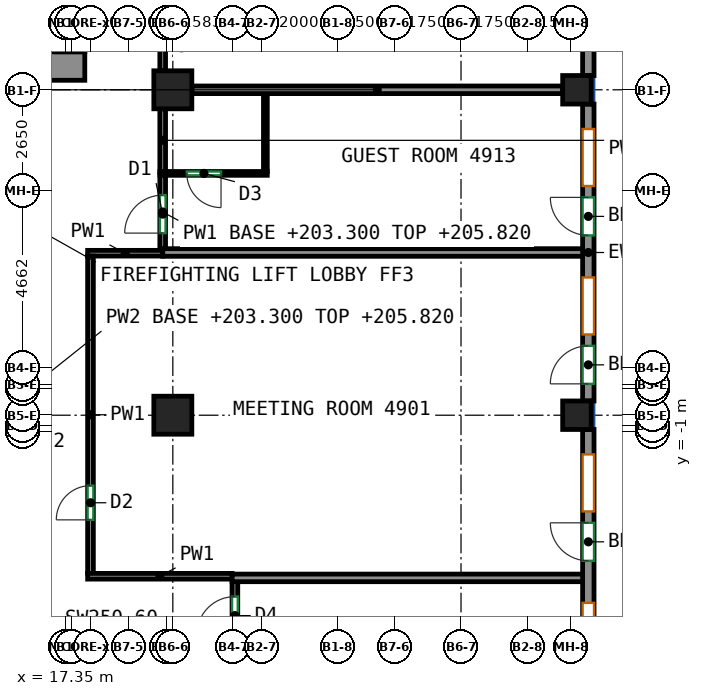
"""IFC4 building model, lengths in metres.
Left out: names, types, materials, properties, quantities, classifications, styles, units other than length and angle.
Written with IfcOpenShell. Run it as: python <this file> out.ifc"""

import sys

from ifc_helpers import new_model, si_unit, direction, frame, frame_2d, origin, origin_2d, place, context, subcontext, project, spatial, rectangle, extrude, source, transform, mapped, element, fill, save


model = new_model("IFC4")
c1 = context("Model", 3, precision=1e-05, world=origin(), true_north=direction((0.0, 1.0)))
c2 = subcontext(c1, "Body", "Model", "MODEL_VIEW")
j1 = project(units=[si_unit("LENGTHUNIT", "METRE"), si_unit("PLANEANGLEUNIT", "RADIAN")], contexts=[c1])
p1 = place(None, origin())
s1 = spatial("IfcSite", under=j1, at=p1, CompositionType="ELEMENT")
p2 = place(p1, origin())
s2 = spatial("IfcBuilding", under=s1, at=p2, CompositionType="ELEMENT")
p3 = place(p2, frame((0.0, 0.0, 203.3)))
s3 = spatial("IfcBuildingStorey", under=s2, at=p3, CompositionType="ELEMENT", Elevation=203.3)
m1 = source(origin(), c2, "Body", "SweptSolid", [
    extrude(rectangle(XDim=1.0, YDim=1.0, at=origin_2d()), origin(), (0.0, 0.0, 1.0), 3.12),
])
for number, where, z_axis, x_axis in (
    (1, (20.167, -0.562, 0.0), (0.0, 0.0, 1.0), (1.0, 0.0, 0.0)),
    (2, (20.167, 8.0, 0.0), (0.0, 0.0, 1.0), (1.0, 0.0, 0.0)),
):
    element("IfcColumn", number, at=place(p3, frame(where, z_axis=z_axis, x_axis=x_axis)), inside=s3, PredefinedType="COLUMN", context=c2, shape_type="MappedRepresentation", body=[
        mapped(m1, transform((0.0, 0.0, 0.0))),
    ])
m2 = source(origin(), c2, "Body", "SweptSolid", [
    extrude(rectangle(XDim=0.75, YDim=0.75, at=origin_2d()), origin(), (0.0, 0.0, 1.0), 3.12),
])
for number, where, z_axis, x_axis in (
    (3, (30.8, -0.562, 0.0), (0.0, 0.0, 1.0), (1.0, 0.0, 0.0)),
    (4, (30.8, 8.0, 0.0), (0.0, 0.0, 1.0), (1.0, 0.0, 0.0)),
):
    element("IfcColumn", number, at=place(p3, frame(where, z_axis=z_axis, x_axis=x_axis)), inside=s3, PredefinedType="COLUMN", context=c2, shape_type="MappedRepresentation", body=[
        mapped(m2, transform((0.0, 0.0, 0.0))),
    ])
m3 = source(origin(), c2, "Body", "SweptSolid", [
    extrude(rectangle(XDim=5.38, YDim=0.75, at=frame_2d((2.69, 0.0))), origin(), (0.0, 0.0, 1.0), 3.12),
])
p4 = place(p3, frame((12.47, 8.625, 0.0), z_axis=(0.0, 0.0, 1.0), x_axis=(1.0, 0.0, 0.0)))
e5 = element("IfcWall", 5, at=p4, inside=s3, PredefinedType="SHEAR", context=c2, shape_type="MappedRepresentation", body=[
    mapped(m3, transform((0.0, 0.0, 0.0))),
])
p5 = place(p4, frame((2.18, 0.0, 0.0)))
e6 = element("IfcOpeningElement", 6, at=p5, cuts=e5, PredefinedType="OPENING", context=c2, shape_type="SweptSolid", body=[
    extrude(rectangle(XDim=1.2, YDim=2.1, at=frame_2d((0.6, 1.05))), frame((0.0, 0.385, 0.0), z_axis=(0.0, -1.0, 0.0), x_axis=(1.0, 0.0, 0.0)), (0.0, 0.0, 1.0), 0.77),
])
m4 = source(origin(), c2, "Body", "SweptSolid", [
    extrude(rectangle(XDim=7.812, YDim=0.3, at=frame_2d((3.906, 0.0))), origin(), (0.0, 0.0, 1.0), 3.12),
])
p6 = place(p3, frame((31.1, -8.75, 0.0), z_axis=(0.0, 0.0, 1.0), x_axis=(0.0, 1.0, 0.0)))
e7 = element("IfcWall", 7, at=p6, inside=s3, PredefinedType="SOLIDWALL", context=c2, shape_type="MappedRepresentation", body=[
    mapped(m4, transform((0.0, 0.0, 0.0))),
])
p7 = place(p6, frame((1.75, 0.0, 0.85)))
e8 = element("IfcOpeningElement", 8, at=p7, cuts=e7, PredefinedType="OPENING", context=c2, shape_type="SweptSolid", body=[
    extrude(rectangle(XDim=1.5, YDim=1.95, at=frame_2d((0.75, 0.975))), frame((0.0, 0.16, 0.0), z_axis=(0.0, -1.0, 0.0), x_axis=(1.0, 0.0, 0.0)), (0.0, 0.0, 1.0), 0.32),
])
p8 = place(p6, frame((5.656, 0.0, 0.85)))
e9 = element("IfcOpeningElement", 9, at=p8, cuts=e7, PredefinedType="OPENING", context=c2, shape_type="SweptSolid", body=[
    extrude(rectangle(XDim=1.5, YDim=1.95, at=frame_2d((0.75, 0.975))), frame((0.0, 0.16, 0.0), z_axis=(0.0, -1.0, 0.0), x_axis=(1.0, 0.0, 0.0)), (0.0, 0.0, 1.0), 0.32),
])
p9 = place(p6, frame((4.356, 0.0, 0.0)))
e10 = element("IfcOpeningElement", 10, at=p9, cuts=e7, PredefinedType="OPENING", context=c2, shape_type="SweptSolid", body=[
    extrude(rectangle(XDim=1.0, YDim=2.1, at=frame_2d((0.5, 1.05))), frame((0.0, 0.16, 0.0), z_axis=(0.0, -1.0, 0.0), x_axis=(1.0, 0.0, 0.0)), (0.0, 0.0, 1.0), 0.32),
])
p10 = place(p3, frame((31.1, -0.188, 0.0), z_axis=(0.0, 0.0, 1.0), x_axis=(0.0, 1.0, 0.0)))
e11 = element("IfcWall", 11, at=p10, inside=s3, PredefinedType="SOLIDWALL", context=c2, shape_type="MappedRepresentation", body=[
    mapped(m4, transform((0.0, 0.0, 0.0))),
])
p11 = place(p10, frame((1.75, 0.0, 0.85)))
e12 = element("IfcOpeningElement", 12, at=p11, cuts=e11, PredefinedType="OPENING", context=c2, shape_type="SweptSolid", body=[
    extrude(rectangle(XDim=1.5, YDim=1.95, at=frame_2d((0.75, 0.975))), frame((0.0, 0.16, 0.0), z_axis=(0.0, -1.0, 0.0), x_axis=(1.0, 0.0, 0.0)), (0.0, 0.0, 1.0), 0.32),
])
p12 = place(p10, frame((0.45, 0.0, 0.0)))
e13 = element("IfcOpeningElement", 13, at=p12, cuts=e11, PredefinedType="OPENING", context=c2, shape_type="SweptSolid", body=[
    extrude(rectangle(XDim=1.0, YDim=2.1, at=frame_2d((0.5, 1.05))), frame((0.0, 0.16, 0.0), z_axis=(0.0, -1.0, 0.0), x_axis=(1.0, 0.0, 0.0)), (0.0, 0.0, 1.0), 0.32),
])
p13 = place(p10, frame((5.656, 0.0, 0.85)))
e14 = element("IfcOpeningElement", 14, at=p13, cuts=e11, PredefinedType="OPENING", context=c2, shape_type="SweptSolid", body=[
    extrude(rectangle(XDim=1.5, YDim=1.95, at=frame_2d((0.75, 0.975))), frame((0.0, 0.16, 0.0), z_axis=(0.0, -1.0, 0.0), x_axis=(1.0, 0.0, 0.0)), (0.0, 0.0, 1.0), 0.32),
])
p14 = place(p10, frame((4.356, 0.0, 0.0)))
e15 = element("IfcOpeningElement", 15, at=p14, cuts=e11, PredefinedType="OPENING", context=c2, shape_type="SweptSolid", body=[
    extrude(rectangle(XDim=1.0, YDim=2.1, at=frame_2d((0.5, 1.05))), frame((0.0, 0.16, 0.0), z_axis=(0.0, -1.0, 0.0), x_axis=(1.0, 0.0, 0.0)), (0.0, 0.0, 1.0), 0.32),
])
m5 = source(origin(), c2, "Body", "SweptSolid", [
    extrude(rectangle(XDim=14.0, YDim=0.3, at=frame_2d((7.0, 0.0))), origin(), (0.0, 0.0, 1.0), 3.12),
])
p15 = place(p3, frame((31.1, 8.375, 0.0), z_axis=(0.0, 0.0, 1.0), x_axis=(0.0, 1.0, 0.0)))
e16 = element("IfcWall", 16, at=p15, inside=s3, PredefinedType="SOLIDWALL", context=c2, shape_type="MappedRepresentation", body=[
    mapped(m5, transform((0.0, 0.0, 0.0))),
])
p16 = place(p15, frame((1.75, 0.0, 0.85)))
e17 = element("IfcOpeningElement", 17, at=p16, cuts=e16, PredefinedType="OPENING", context=c2, shape_type="SweptSolid", body=[
    extrude(rectangle(XDim=1.5, YDim=1.95, at=frame_2d((0.75, 0.975))), frame((0.0, 0.16, 0.0), z_axis=(0.0, -1.0, 0.0), x_axis=(1.0, 0.0, 0.0)), (0.0, 0.0, 1.0), 0.32),
])
p17 = place(p15, frame((5.25, 0.0, 0.85)))
e18 = element("IfcOpeningElement", 18, at=p17, cuts=e16, PredefinedType="OPENING", context=c2, shape_type="SweptSolid", body=[
    extrude(rectangle(XDim=1.5, YDim=1.95, at=frame_2d((0.75, 0.975))), frame((0.0, 0.16, 0.0), z_axis=(0.0, -1.0, 0.0), x_axis=(1.0, 0.0, 0.0)), (0.0, 0.0, 1.0), 0.32),
])
p18 = place(p15, frame((8.75, 0.0, 0.85)))
e19 = element("IfcOpeningElement", 19, at=p18, cuts=e16, PredefinedType="OPENING", context=c2, shape_type="SweptSolid", body=[
    extrude(rectangle(XDim=1.5, YDim=1.95, at=frame_2d((0.75, 0.975))), frame((0.0, 0.16, 0.0), z_axis=(0.0, -1.0, 0.0), x_axis=(1.0, 0.0, 0.0)), (0.0, 0.0, 1.0), 0.32),
])
p19 = place(p15, frame((12.25, 0.0, 0.85)))
e20 = element("IfcOpeningElement", 20, at=p19, cuts=e16, PredefinedType="OPENING", context=c2, shape_type="SweptSolid", body=[
    extrude(rectangle(XDim=1.5, YDim=1.95, at=frame_2d((0.75, 0.975))), frame((0.0, 0.16, 0.0), z_axis=(0.0, -1.0, 0.0), x_axis=(1.0, 0.0, 0.0)), (0.0, 0.0, 1.0), 0.32),
])
p20 = place(p3, frame((19.9, 3.809, 0.0), z_axis=(0.0, 0.0, 1.0), x_axis=(0.0, 1.0, 0.0)))
e21 = element("IfcWall", 21, at=p20, inside=s3, PredefinedType="PARTITIONING", context=c2, shape_type="SweptSolid", body=[
    extrude(rectangle(XDim=1.951, YDim=0.15, at=frame_2d((0.976, 0.0))), origin(), (0.0, 0.0, 1.0), 2.52),
])
p21 = place(p20, frame((0.42, 0.0, 0.0)))
e22 = element("IfcOpeningElement", 22, at=p21, cuts=e21, PredefinedType="OPENING", context=c2, shape_type="SweptSolid", body=[
    extrude(rectangle(XDim=1.0, YDim=2.1, at=frame_2d((0.5, 1.05))), frame((0.0, 0.085, 0.0), z_axis=(0.0, -1.0, 0.0), x_axis=(1.0, 0.0, 0.0)), (0.0, 0.0, 1.0), 0.17),
])
p22 = place(p3, frame((19.9, 5.84, 0.0), z_axis=(0.0, 0.0, 1.0), x_axis=(0.0, 1.0, 0.0)))
e23 = element("IfcWall", 23, at=p22, inside=s3, PredefinedType="PARTITIONING", context=c2, shape_type="SweptSolid", body=[
    extrude(rectangle(XDim=1.66, YDim=0.15, at=frame_2d((0.83, 0.0))), origin(), (0.0, 0.0, 1.0), 2.52),
])
p23 = place(p3, frame((19.9, 8.5, 0.0), z_axis=(0.0, 0.0, 1.0), x_axis=(0.0, 1.0, 0.0)))
e24 = element("IfcWall", 24, at=p23, inside=s3, PredefinedType="PARTITIONING", context=c2, shape_type="SweptSolid", body=[
    extrude(rectangle(XDim=1.25, YDim=0.15, at=frame_2d((0.625, 0.0))), origin(), (0.0, 0.0, 1.0), 3.12),
])
p24 = place(p3, frame((17.925, 3.7, 0.0), z_axis=(0.0, 0.0, 1.0), x_axis=(1.0, 0.0, 0.0)))
e25 = element("IfcWall", 25, at=p24, inside=s3, PredefinedType="PARTITIONING", context=c2, shape_type="SweptSolid", body=[
    extrude(rectangle(XDim=1.975, YDim=0.15, at=frame_2d((0.987, 0.0))), origin(), (0.0, 0.0, 1.0), 3.12),
])
p25 = place(p3, frame((18.0, -4.725, 0.0), z_axis=(0.0, 0.0, 1.0), x_axis=(0.0, 1.0, 0.0)))
e26 = element("IfcWall", 26, at=p25, inside=s3, PredefinedType="PARTITIONING", context=c2, shape_type="SweptSolid", body=[
    extrude(rectangle(XDim=8.35, YDim=0.15, at=frame_2d((4.175, 0.0))), origin(), (0.0, 0.0, 1.0), 3.12),
])
p26 = place(p25, frame((1.409, 0.0, 0.0)))
e27 = element("IfcOpeningElement", 27, at=p26, cuts=e26, PredefinedType="OPENING", context=c2, shape_type="SweptSolid", body=[
    extrude(rectangle(XDim=0.9, YDim=2.1, at=frame_2d((0.45, 1.05))), frame((0.0, 0.085, 0.0), z_axis=(0.0, -1.0, 0.0), x_axis=(1.0, 0.0, 0.0)), (0.0, 0.0, 1.0), 0.17),
])
p27 = place(p3, frame((17.925, -4.8, 0.0), z_axis=(0.0, 0.0, 1.0), x_axis=(1.0, 0.0, 0.0)))
e28 = element("IfcWall", 28, at=p27, inside=s3, PredefinedType="PARTITIONING", context=c2, shape_type="SweptSolid", body=[
    extrude(rectangle(XDim=3.802, YDim=0.15, at=frame_2d((1.901, 0.0))), origin(), (0.0, 0.0, 1.0), 3.12),
])
p28 = place(p3, frame((21.8, -7.75, 0.0), z_axis=(0.0, 0.0, 1.0), x_axis=(0.0, 1.0, 0.0)))
e29 = element("IfcWall", 29, at=p28, inside=s3, PredefinedType="PARTITIONING", context=c2, shape_type="SweptSolid", body=[
    extrude(rectangle(XDim=2.817, YDim=0.15, at=frame_2d((1.408, 0.0))), origin(), (0.0, 0.0, 1.0), 3.12),
])
p29 = place(p28, frame((1.415, 0.0, 0.0)))
e30 = element("IfcOpeningElement", 30, at=p29, cuts=e29, PredefinedType="OPENING", context=c2, shape_type="SweptSolid", body=[
    extrude(rectangle(XDim=1.0, YDim=2.1, at=frame_2d((0.5, 1.05))), frame((0.0, 0.085, 0.0), z_axis=(0.0, -1.0, 0.0), x_axis=(1.0, 0.0, 0.0)), (0.0, 0.0, 1.0), 0.17),
])
p30 = place(p3, frame((22.652, 5.8, 0.0), z_axis=(0.0, 0.0, 1.0), x_axis=(-1.0, 0.0, 0.0)))
e31 = element("IfcWall", 31, at=p30, inside=s3, PredefinedType="PARTITIONING", context=c2, shape_type="SweptSolid", body=[
    extrude(rectangle(XDim=2.825, YDim=0.1, at=frame_2d((1.413, 0.0))), origin(), (0.0, 0.0, 1.0), 3.12),
])
p31 = place(p30, frame((1.217, 0.0, 0.0)))
e32 = element("IfcOpeningElement", 32, at=p31, cuts=e31, PredefinedType="OPENING", context=c2, shape_type="SweptSolid", body=[
    extrude(rectangle(XDim=0.9, YDim=2.1, at=frame_2d((0.45, 1.05))), frame((0.0, 0.06, 0.0), z_axis=(0.0, -1.0, 0.0), x_axis=(1.0, 0.0, 0.0)), (0.0, 0.0, 1.0), 0.12),
])
p32 = place(p3, frame((22.602, 5.85, 0.0), z_axis=(0.0, 0.0, 1.0), x_axis=(0.0, 1.0, 0.0)))
e33 = element("IfcWall", 33, at=p32, inside=s3, PredefinedType="PARTITIONING", context=c2, shape_type="SweptSolid", body=[
    extrude(rectangle(XDim=2.05, YDim=0.1, at=frame_2d((1.025, 0.0))), origin(), (0.0, 0.0, 1.0), 3.12),
])
p33 = place(p3, frame((19.902, 3.719, 0.0), z_axis=(0.0, 0.0, 1.0), x_axis=(1.0, 0.0, 0.0)))
e34 = element("IfcWall", 34, at=p33, inside=s3, PredefinedType="PARTITIONING", context=c2, shape_type="SweptSolid", body=[
    extrude(rectangle(XDim=11.098, YDim=0.2, at=frame_2d((5.549, 0.0))), origin(), (0.0, 0.0, 1.0), 3.12),
])
p34 = place(p3, frame((20.667, 8.0, 0.0), z_axis=(0.0, 0.0, 1.0), x_axis=(1.0, 0.0, 0.0)))
e35 = element("IfcWall", 35, at=p34, inside=s3, PredefinedType="PARTITIONING", context=c2, shape_type="SweptSolid", body=[
    extrude(rectangle(XDim=9.758, YDim=0.2, at=frame_2d((4.879, 0.0))), origin(), (0.0, 0.0, 1.0), 2.52),
])
p35 = place(p3, frame((21.727, -4.843, 0.0), z_axis=(0.0, 0.0, 1.0), x_axis=(1.0, 0.0, 0.0)))
e36 = element("IfcWall", 36, at=p35, inside=s3, PredefinedType="PARTITIONING", context=c2, shape_type="SweptSolid", body=[
    extrude(rectangle(XDim=9.273, YDim=0.2, at=frame_2d((4.636, 0.0))), origin(), (0.0, 0.0, 1.0), 3.12),
])
p36 = place(p7, origin())
e37 = element("IfcWindow", 37, at=p36, inside=s3, PartitioningType="SINGLE_PANEL", PredefinedType="WINDOW", context=c2, shape_type="SweptSolid", body=[
    extrude(rectangle(XDim=1.5, YDim=1.95, at=frame_2d((0.75, 0.975))), frame((0.0, 0.03, 0.0), z_axis=(0.0, -1.0, 0.0), x_axis=(1.0, 0.0, 0.0)), (0.0, 0.0, 1.0), 0.06),
])
fill(e8, e37)
p37 = place(p8, origin())
e38 = element("IfcWindow", 38, at=p37, inside=s3, PartitioningType="SINGLE_PANEL", PredefinedType="WINDOW", context=c2, shape_type="SweptSolid", body=[
    extrude(rectangle(XDim=1.5, YDim=1.95, at=frame_2d((0.75, 0.975))), frame((0.0, 0.03, 0.0), z_axis=(0.0, -1.0, 0.0), x_axis=(1.0, 0.0, 0.0)), (0.0, 0.0, 1.0), 0.06),
])
fill(e9, e38)
p38 = place(p9, origin())
e39 = element("IfcDoor", 39, at=p38, inside=s3, OperationType="SINGLE_SWING_RIGHT", PredefinedType="DOOR", context=c2, shape_type="SweptSolid", body=[
    extrude(rectangle(XDim=1.0, YDim=2.1, at=frame_2d((0.5, 1.05))), frame((0.0, 0.025, 0.0), z_axis=(0.0, -1.0, 0.0), x_axis=(1.0, 0.0, 0.0)), (0.0, 0.0, 1.0), 0.05),
])
fill(e10, e39)
p39 = place(p11, origin())
e40 = element("IfcWindow", 40, at=p39, inside=s3, PartitioningType="SINGLE_PANEL", PredefinedType="WINDOW", context=c2, shape_type="SweptSolid", body=[
    extrude(rectangle(XDim=1.5, YDim=1.95, at=frame_2d((0.75, 0.975))), frame((0.0, 0.03, 0.0), z_axis=(0.0, -1.0, 0.0), x_axis=(1.0, 0.0, 0.0)), (0.0, 0.0, 1.0), 0.06),
])
fill(e12, e40)
p40 = place(p12, origin())
e41 = element("IfcDoor", 41, at=p40, inside=s3, OperationType="SINGLE_SWING_LEFT", PredefinedType="DOOR", context=c2, shape_type="SweptSolid", body=[
    extrude(rectangle(XDim=1.0, YDim=2.1, at=frame_2d((0.5, 1.05))), frame((0.0, 0.025, 0.0), z_axis=(0.0, -1.0, 0.0), x_axis=(1.0, 0.0, 0.0)), (0.0, 0.0, 1.0), 0.05),
])
fill(e13, e41)
p41 = place(p13, origin())
e42 = element("IfcWindow", 42, at=p41, inside=s3, PartitioningType="SINGLE_PANEL", PredefinedType="WINDOW", context=c2, shape_type="SweptSolid", body=[
    extrude(rectangle(XDim=1.5, YDim=1.95, at=frame_2d((0.75, 0.975))), frame((0.0, 0.03, 0.0), z_axis=(0.0, -1.0, 0.0), x_axis=(1.0, 0.0, 0.0)), (0.0, 0.0, 1.0), 0.06),
])
fill(e14, e42)
p42 = place(p14, origin())
e43 = element("IfcDoor", 43, at=p42, inside=s3, OperationType="SINGLE_SWING_RIGHT", PredefinedType="DOOR", context=c2, shape_type="SweptSolid", body=[
    extrude(rectangle(XDim=1.0, YDim=2.1, at=frame_2d((0.5, 1.05))), frame((0.0, 0.025, 0.0), z_axis=(0.0, -1.0, 0.0), x_axis=(1.0, 0.0, 0.0)), (0.0, 0.0, 1.0), 0.05),
])
fill(e15, e43)
p43 = place(p29, origin())
e44 = element("IfcDoor", 44, at=p43, inside=s3, OperationType="SINGLE_SWING_LEFT", PredefinedType="DOOR", context=c2, shape_type="SweptSolid", body=[
    extrude(rectangle(XDim=1.0, YDim=2.1, at=frame_2d((0.5, 1.05))), frame((0.0, 0.025, 0.0), z_axis=(0.0, -1.0, 0.0), x_axis=(1.0, 0.0, 0.0)), (0.0, 0.0, 1.0), 0.05),
])
fill(e30, e44)
p44 = place(p26, origin())
e45 = element("IfcDoor", 45, at=p44, inside=s3, OperationType="SINGLE_SWING_LEFT", PredefinedType="DOOR", context=c2, shape_type="SweptSolid", body=[
    extrude(rectangle(XDim=0.9, YDim=2.1, at=frame_2d((0.45, 1.05))), frame((0.0, 0.025, 0.0), z_axis=(0.0, -1.0, 0.0), x_axis=(1.0, 0.0, 0.0)), (0.0, 0.0, 1.0), 0.05),
])
fill(e27, e45)
p45 = place(p21, origin())
e46 = element("IfcDoor", 46, at=p45, inside=s3, OperationType="SINGLE_SWING_LEFT", PredefinedType="DOOR", context=c2, shape_type="SweptSolid", body=[
    extrude(rectangle(XDim=1.0, YDim=2.1, at=frame_2d((0.5, 1.05))), frame((0.0, 0.025, 0.0), z_axis=(0.0, -1.0, 0.0), x_axis=(1.0, 0.0, 0.0)), (0.0, 0.0, 1.0), 0.05),
])
fill(e22, e46)
p46 = place(p31, origin())
e47 = element("IfcDoor", 47, at=p46, inside=s3, OperationType="SINGLE_SWING_LEFT", PredefinedType="DOOR", context=c2, shape_type="SweptSolid", body=[
    extrude(rectangle(XDim=0.9, YDim=2.1, at=frame_2d((0.45, 1.05))), frame((0.0, 0.025, 0.0), z_axis=(0.0, -1.0, 0.0), x_axis=(1.0, 0.0, 0.0)), (0.0, 0.0, 1.0), 0.05),
])
fill(e32, e47)
save(model, sys.argv[1])
